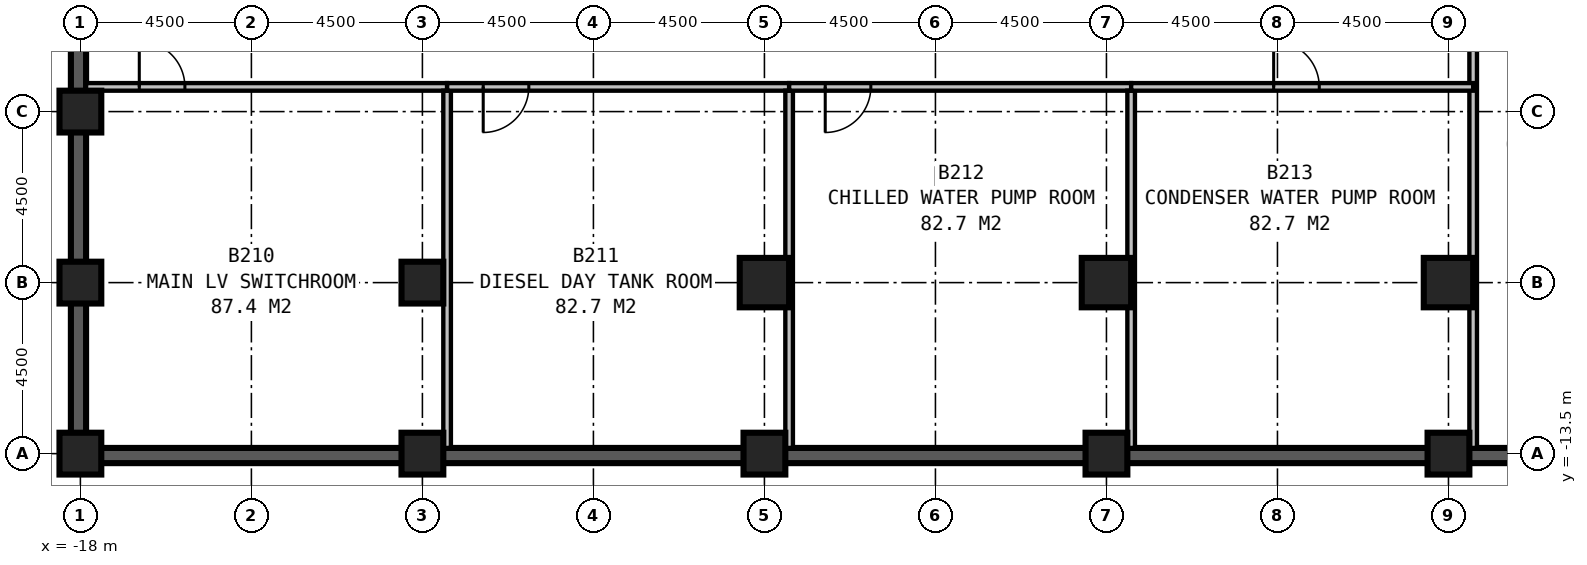
"""IFC4 building model, lengths in metres.
Left out: names, types, materials, properties, quantities, classifications, styles, units other than length and angle.
Written with IfcOpenShell. Run it as: python <this file> out.ifc"""

import sys

from ifc_helpers import new_model, si_unit, direction, frame, frame_2d, origin, origin_2d, place, context, subcontext, project, spatial, rectangle, extrude, element, fill, save


model = new_model("IFC4")
c1 = context("Model", 3, precision=1e-05, world=origin(), true_north=direction((0.0, 1.0)))
c2 = subcontext(c1, "Body", "Model", "MODEL_VIEW")
j1 = project(units=[si_unit("LENGTHUNIT", "METRE"), si_unit("PLANEANGLEUNIT", "RADIAN")], contexts=[c1])
p1 = place(None, origin())
s1 = spatial("IfcSite", under=j1, at=p1, CompositionType="ELEMENT")
p2 = place(p1, origin())
s2 = spatial("IfcBuilding", under=s1, at=p2, CompositionType="ELEMENT")
p3 = place(p2, frame((0.0, 0.0, -9.0)))
s3 = spatial("IfcBuildingStorey", under=s2, at=p3, CompositionType="ELEMENT", Elevation=-9.0)
for number, where, z_axis, x_axis in (
    (1, (-18.0, -13.5, -0.6), (0.0, 0.0, 1.0), (1.0, 0.0, 0.0)),
    (2, (-9.0, -13.5, -0.6), (0.0, 0.0, 1.0), (1.0, 0.0, 0.0)),
    (3, (-18.0, -4.5, -0.6), (0.0, 0.0, 1.0), (1.0, 0.0, 0.0)),
    (4, (0.0, -13.5, -0.6), (0.0, 0.0, 1.0), (1.0, 0.0, 0.0)),
    (5, (9.0, -13.5, -0.6), (0.0, 0.0, 1.0), (1.0, 0.0, 0.0)),
    (6, (18.0, -13.5, -0.6), (0.0, 0.0, 1.0), (1.0, 0.0, 0.0)),
):
    element("IfcColumn", number, at=place(p3, frame(where, z_axis=z_axis, x_axis=x_axis)), inside=s3, PredefinedType="COLUMN", context=c2, shape_type="SweptSolid", body=[
        extrude(rectangle(XDim=1.1, YDim=1.1, at=origin_2d()), origin(), (0.0, 0.0, 1.0), 5.1),
    ])
for number, where, z_axis, x_axis in (
    (7, (0.0, -9.0, -0.6), (0.0, 0.0, 1.0), (1.0, 0.0, 0.0)),
    (8, (9.0, -9.0, -0.6), (0.0, 0.0, 1.0), (1.0, 0.0, 0.0)),
    (9, (18.0, -9.0, -0.6), (0.0, 0.0, 1.0), (1.0, 0.0, 0.0)),
):
    element("IfcColumn", number, at=place(p3, frame(where, z_axis=z_axis, x_axis=x_axis)), inside=s3, PredefinedType="COLUMN", context=c2, shape_type="SweptSolid", body=[
        extrude(rectangle(XDim=1.3, YDim=1.3, at=origin_2d()), origin(), (0.0, 0.0, 1.0), 5.1),
    ])
for number, where, z_axis, x_axis in (
    (10, (-18.0, -9.0, -0.6), (0.0, 0.0, 1.0), (1.0, 0.0, 0.0)),
    (11, (-9.0, -9.0, -0.6), (0.0, 0.0, 1.0), (1.0, 0.0, 0.0)),
):
    element("IfcColumn", number, at=place(p3, frame(where, z_axis=z_axis, x_axis=x_axis)), inside=s3, PredefinedType="COLUMN", context=c2, shape_type="SweptSolid", body=[
        extrude(rectangle(XDim=1.1, YDim=1.1, at=origin_2d()), origin(), (0.0, 0.0, 1.0), 5.1),
    ])
p4 = place(p3, frame((-18.25, -13.55, -0.6), z_axis=(0.0, 0.0, 1.0), x_axis=(1.0, 0.0, 0.0)))
e12 = element("IfcWall", 12, at=p4, inside=s3, PredefinedType="SOLIDWALL", context=c2, shape_type="SweptSolid", body=[
    extrude(rectangle(XDim=77.0, YDim=0.4, at=frame_2d((38.5, 0.0))), origin(), (0.0, 0.0, 1.0), 5.1),
])
p5 = place(p3, frame((-18.05, 40.35, -0.6), z_axis=(0.0, 0.0, 1.0), x_axis=(0.0, -1.0, 0.0)))
e13 = element("IfcWall", 13, at=p5, inside=s3, PredefinedType="SOLIDWALL", context=c2, shape_type="SweptSolid", body=[
    extrude(rectangle(XDim=53.7, YDim=0.4, at=frame_2d((26.85, 0.0))), origin(), (0.0, 0.0, 1.0), 5.1),
])
for number, where, z_axis, x_axis in (
    (14, (-8.35, -13.35, 0.0), (0.0, 0.0, 1.0), (0.0, 1.0, 0.0)),
    (15, (0.65, -13.35, 0.0), (0.0, 0.0, 1.0), (0.0, 1.0, 0.0)),
    (16, (9.65, -13.35, 0.0), (0.0, 0.0, 1.0), (0.0, 1.0, 0.0)),
):
    element("IfcWall", number, at=place(p3, frame(where, z_axis=z_axis, x_axis=x_axis)), inside=s3, PredefinedType="PARTITIONING", context=c2, shape_type="SweptSolid", body=[
        extrude(rectangle(XDim=9.4, YDim=0.2, at=frame_2d((4.7, 0.0))), origin(), (0.0, 0.0, 1.0), 3.3),
    ])
p6 = place(p3, frame((18.65, -13.35, 0.0), z_axis=(0.0, 0.0, 1.0), x_axis=(0.0, 1.0, 0.0)))
e17 = element("IfcWall", 17, at=p6, inside=s3, PredefinedType="PARTITIONING", context=c2, shape_type="SweptSolid", body=[
    extrude(rectangle(XDim=11.85, YDim=0.2, at=frame_2d((5.925, 0.0))), origin(), (0.0, 0.0, 1.0), 3.3),
])
p7 = place(p3, frame((-17.85, -3.85, 0.0), z_axis=(0.0, 0.0, 1.0), x_axis=(1.0, 0.0, 0.0)))
e18 = element("IfcWall", 18, at=p7, inside=s3, PredefinedType="PARTITIONING", context=c2, shape_type="SweptSolid", body=[
    extrude(rectangle(XDim=9.5, YDim=0.2, at=frame_2d((4.75, 0.0))), origin(), (0.0, 0.0, 1.0), 4.25),
])
p8 = place(p7, frame((1.4, 0.0, 0.0)))
e19 = element("IfcOpeningElement", 19, at=p8, cuts=e18, PredefinedType="OPENING", context=c2, shape_type="SweptSolid", body=[
    extrude(rectangle(XDim=1.2, YDim=2.1, at=frame_2d((0.6, 1.05))), frame((0.0, 0.11, 0.0), z_axis=(0.0, -1.0, 0.0), x_axis=(1.0, 0.0, 0.0)), (0.0, 0.0, 1.0), 0.22),
])
p9 = place(p3, frame((-8.35, -3.85, 0.0), z_axis=(0.0, 0.0, 1.0), x_axis=(1.0, 0.0, 0.0)))
e20 = element("IfcWall", 20, at=p9, inside=s3, PredefinedType="PARTITIONING", context=c2, shape_type="SweptSolid", body=[
    extrude(rectangle(XDim=9.0, YDim=0.2, at=frame_2d((4.5, 0.0))), origin(), (0.0, 0.0, 1.0), 4.25),
])
p10 = place(p9, frame((2.15, 0.0, 0.0), z_axis=(0.0, 0.0, 1.0), x_axis=(-1.0, 0.0, 0.0)))
e21 = element("IfcOpeningElement", 21, at=p10, cuts=e20, PredefinedType="OPENING", context=c2, shape_type="SweptSolid", body=[
    extrude(rectangle(XDim=1.2, YDim=2.1, at=frame_2d((0.6, 1.05))), frame((0.0, 0.11, 0.0), z_axis=(0.0, -1.0, 0.0), x_axis=(1.0, 0.0, 0.0)), (0.0, 0.0, 1.0), 0.22),
])
p11 = place(p3, frame((0.65, -3.85, 0.0), z_axis=(0.0, 0.0, 1.0), x_axis=(1.0, 0.0, 0.0)))
e22 = element("IfcWall", 22, at=p11, inside=s3, PredefinedType="PARTITIONING", context=c2, shape_type="SweptSolid", body=[
    extrude(rectangle(XDim=9.0, YDim=0.2, at=frame_2d((4.5, 0.0))), origin(), (0.0, 0.0, 1.0), 4.25),
])
p12 = place(p11, frame((2.15, 0.0, 0.0), z_axis=(0.0, 0.0, 1.0), x_axis=(-1.0, 0.0, 0.0)))
e23 = element("IfcOpeningElement", 23, at=p12, cuts=e22, PredefinedType="OPENING", context=c2, shape_type="SweptSolid", body=[
    extrude(rectangle(XDim=1.2, YDim=2.1, at=frame_2d((0.6, 1.05))), frame((0.0, 0.11, 0.0), z_axis=(0.0, -1.0, 0.0), x_axis=(1.0, 0.0, 0.0)), (0.0, 0.0, 1.0), 0.22),
])
p13 = place(p3, frame((9.65, -3.85, 0.0), z_axis=(0.0, 0.0, 1.0), x_axis=(1.0, 0.0, 0.0)))
e24 = element("IfcWall", 24, at=p13, inside=s3, PredefinedType="PARTITIONING", context=c2, shape_type="SweptSolid", body=[
    extrude(rectangle(XDim=9.0, YDim=0.2, at=frame_2d((4.5, 0.0))), origin(), (0.0, 0.0, 1.0), 4.25),
])
p14 = place(p13, frame((3.75, 0.0, 0.0)))
e25 = element("IfcOpeningElement", 25, at=p14, cuts=e24, PredefinedType="OPENING", context=c2, shape_type="SweptSolid", body=[
    extrude(rectangle(XDim=1.2, YDim=2.1, at=frame_2d((0.6, 1.05))), frame((0.0, 0.11, 0.0), z_axis=(0.0, -1.0, 0.0), x_axis=(1.0, 0.0, 0.0)), (0.0, 0.0, 1.0), 0.22),
])
p15 = place(p8, origin())
e26 = element("IfcDoor", 26, at=p15, inside=s3, OperationType="SINGLE_SWING_LEFT", PredefinedType="DOOR", context=c2, shape_type="SweptSolid", body=[
    extrude(rectangle(XDim=1.2, YDim=2.1, at=frame_2d((0.6, 1.05))), frame((0.0, 0.025, 0.0), z_axis=(0.0, -1.0, 0.0), x_axis=(1.0, 0.0, 0.0)), (0.0, 0.0, 1.0), 0.05),
])
fill(e19, e26)
p16 = place(p10, origin())
e27 = element("IfcDoor", 27, at=p16, inside=s3, OperationType="SINGLE_SWING_RIGHT", PredefinedType="DOOR", context=c2, shape_type="SweptSolid", body=[
    extrude(rectangle(XDim=1.2, YDim=2.1, at=frame_2d((0.6, 1.05))), frame((0.0, 0.025, 0.0), z_axis=(0.0, -1.0, 0.0), x_axis=(1.0, 0.0, 0.0)), (0.0, 0.0, 1.0), 0.05),
])
fill(e21, e27)
p17 = place(p12, origin())
e28 = element("IfcDoor", 28, at=p17, inside=s3, OperationType="SINGLE_SWING_RIGHT", PredefinedType="DOOR", context=c2, shape_type="SweptSolid", body=[
    extrude(rectangle(XDim=1.2, YDim=2.1, at=frame_2d((0.6, 1.05))), frame((0.0, 0.025, 0.0), z_axis=(0.0, -1.0, 0.0), x_axis=(1.0, 0.0, 0.0)), (0.0, 0.0, 1.0), 0.05),
])
fill(e23, e28)
p18 = place(p14, origin())
e29 = element("IfcDoor", 29, at=p18, inside=s3, OperationType="SINGLE_SWING_LEFT", PredefinedType="DOOR", context=c2, shape_type="SweptSolid", body=[
    extrude(rectangle(XDim=1.2, YDim=2.1, at=frame_2d((0.6, 1.05))), frame((0.0, 0.025, 0.0), z_axis=(0.0, -1.0, 0.0), x_axis=(1.0, 0.0, 0.0)), (0.0, 0.0, 1.0), 0.05),
])
fill(e25, e29)
save(model, sys.argv[1])
